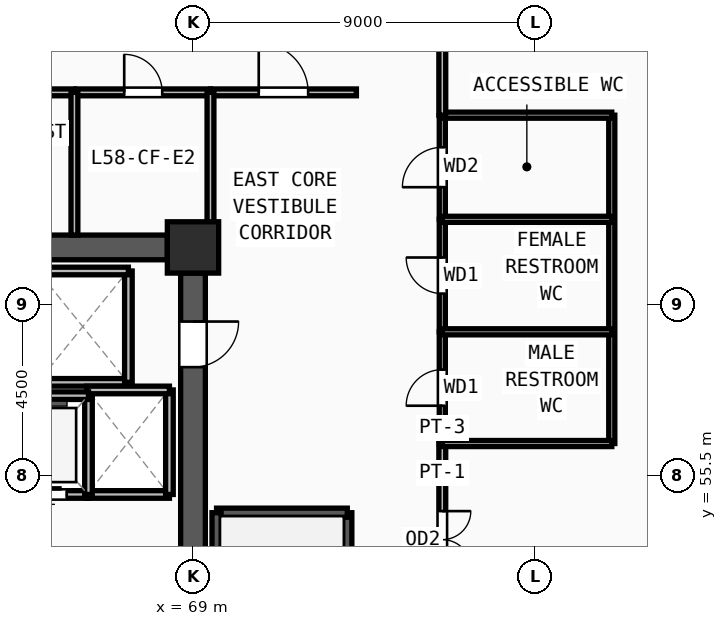
"""IFC4 building model, lengths in metres.
Left out: names, types, materials, properties, quantities, classifications, styles, units other than length and angle.
Written with IfcOpenShell. Run it as: python <this file> out.ifc"""

import sys

from ifc_helpers import new_model, si_unit, direction, frame, frame_2d, origin, origin_2d, place, context, subcontext, project, spatial, rectangle, extrude, source, transform, mapped, element, fill, save


model = new_model("IFC4")
c1 = context("Model", 3, precision=1e-05, world=origin(), true_north=direction((0.0, 1.0)))
c2 = subcontext(c1, "Body", "Model", "MODEL_VIEW")
j1 = project(units=[si_unit("LENGTHUNIT", "METRE"), si_unit("PLANEANGLEUNIT", "RADIAN")], contexts=[c1])
p1 = place(None, origin())
s1 = spatial("IfcSite", under=j1, at=p1, CompositionType="ELEMENT")
p2 = place(p1, origin())
s2 = spatial("IfcBuilding", under=s1, at=p2, CompositionType="ELEMENT")
p3 = place(p2, frame((0.0, 0.0, 224.25)))
s3 = spatial("IfcBuildingStorey", under=s2, at=p3, CompositionType="ELEMENT", Elevation=224.25)
m1 = source(origin(), c2, "Body", "SweptSolid", [
    extrude(rectangle(XDim=1.35, YDim=1.35, at=origin_2d()), origin(), (0.0, 0.0, 1.0), 3.75),
])
p4 = place(p3, frame((69.0, 61.5, 0.0), z_axis=(0.0, 0.0, 1.0), x_axis=(1.0, 0.0, 0.0)))
e1 = element("IfcColumn", 1, at=p4, inside=s3, PredefinedType="COLUMN", context=c2, shape_type="MappedRepresentation", body=[
    mapped(m1, transform((0.0, 0.0, 0.0), x_axis=(1.0, 0.0, 0.0), y_axis=(0.0, 1.0, 0.0), z_axis=(0.0, 0.0, 1.0), scale=1.0)),
])
p5 = place(p3, frame((79.867, 40.305, 0.0), z_axis=(0.0, 0.0, 1.0), x_axis=(0.444873284972, 0.895593524049, 0.0)))
e2 = element("IfcWall", 2, at=p5, inside=s3, PredefinedType="SOLIDWALL", context=c2, shape_type="SweptSolid", body=[
    extrude(rectangle(XDim=29.02, YDim=0.38, at=frame_2d((14.51, 0.0))), origin(), (0.0, 0.0, 1.0), 3.57),
])
m2 = source(origin(), c2, "Body", "SweptSolid", [
    extrude(rectangle(XDim=1.5, YDim=1.9, at=frame_2d((0.75, 0.95))), frame((0.0, 0.2, 0.0), z_axis=(0.0, -1.0, 0.0), x_axis=(1.0, 0.0, 0.0)), (0.0, 0.0, 1.0), 0.4),
])
p6 = place(p5, frame((6.505, 0.0, 0.55)))
e3 = element("IfcOpeningElement", 3, at=p6, cuts=e2, PredefinedType="OPENING", context=c2, shape_type="MappedRepresentation", body=[
    mapped(m2, transform((0.0, 0.0, 0.0), x_axis=(1.0, 0.0, 0.0), y_axis=(0.0, 1.0, 0.0), z_axis=(0.0, 0.0, 1.0), scale=1.0)),
])
p7 = place(p5, frame((13.76, 0.0, 0.55)))
e4 = element("IfcOpeningElement", 4, at=p7, cuts=e2, PredefinedType="OPENING", context=c2, shape_type="MappedRepresentation", body=[
    mapped(m2, transform((0.0, 0.0, 0.0), x_axis=(1.0, 0.0, 0.0), y_axis=(0.0, 1.0, 0.0), z_axis=(0.0, 0.0, 1.0), scale=1.0)),
])
p8 = place(p5, frame((21.015, 0.0, 0.55)))
e5 = element("IfcOpeningElement", 5, at=p8, cuts=e2, PredefinedType="OPENING", context=c2, shape_type="MappedRepresentation", body=[
    mapped(m2, transform((0.0, 0.0, 0.0), x_axis=(1.0, 0.0, 0.0), y_axis=(0.0, 1.0, 0.0), z_axis=(0.0, 0.0, 1.0), scale=1.0)),
])
p9 = place(p3, frame((60.675, 61.5, 0.0), z_axis=(0.0, 0.0, 1.0), x_axis=(1.0, 0.0, 0.0)))
e6 = element("IfcWall", 6, at=p9, inside=s3, PredefinedType="SHEAR", context=c2, shape_type="SweptSolid", body=[
    extrude(rectangle(XDim=7.65, YDim=0.65, at=frame_2d((3.825, 0.0))), origin(), (0.0, 0.0, 1.0), 3.57),
])
p10 = place(p3, frame((69.0, 60.825, 0.0), z_axis=(0.0, 0.0, 1.0), x_axis=(0.0, -1.0, 0.0)))
e7 = element("IfcWall", 7, at=p10, inside=s3, PredefinedType="SHEAR", context=c2, shape_type="SweptSolid", body=[
    extrude(rectangle(XDim=13.65, YDim=0.65, at=frame_2d((6.825, 0.0))), origin(), (0.0, 0.0, 1.0), 3.57),
])
m3 = source(origin(), c2, "Body", "SweptSolid", [
    extrude(rectangle(XDim=1.2, YDim=2.2, at=frame_2d((0.6, 1.1))), frame((0.0, 0.335, 0.0), z_axis=(0.0, -1.0, 0.0), x_axis=(1.0, 0.0, 0.0)), (0.0, 0.0, 1.0), 0.67),
])
p11 = place(p10, frame((1.275, 0.0, 0.0)))
e8 = element("IfcOpeningElement", 8, at=p11, cuts=e7, PredefinedType="OPENING", context=c2, shape_type="MappedRepresentation", body=[
    mapped(m3, transform((0.0, 0.0, 0.0), x_axis=(1.0, 0.0, 0.0), y_axis=(0.0, 1.0, 0.0), z_axis=(0.0, 0.0, 1.0), scale=1.0)),
])
p12 = place(p3, frame((73.06, 46.7, 0.0), z_axis=(0.0, 0.0, 1.0), x_axis=(0.0, 1.0, 0.0)))
e9 = element("IfcWall", 9, at=p12, inside=s3, PredefinedType="SOLIDWALL", context=c2, shape_type="SweptSolid", body=[
    extrude(rectangle(XDim=7.82, YDim=0.24, at=frame_2d((3.91, 0.0))), origin(), (0.0, 0.0, 1.0), 3.57),
])
m4 = source(origin(), c2, "Body", "SweptSolid", [
    extrude(rectangle(XDim=1.2, YDim=2.2, at=frame_2d((0.6, 1.1))), frame((0.0, 0.13, 0.0), z_axis=(0.0, -1.0, 0.0), x_axis=(1.0, 0.0, 0.0)), (0.0, 0.0, 1.0), 0.26),
])
p13 = place(p12, frame((0.32, 0.0, 0.0)))
e10 = element("IfcOpeningElement", 10, at=p13, cuts=e9, PredefinedType="OPENING", context=c2, shape_type="MappedRepresentation", body=[
    mapped(m4, transform((0.0, 0.0, 0.0), x_axis=(1.0, 0.0, 0.0), y_axis=(0.0, 1.0, 0.0), z_axis=(0.0, 0.0, 1.0), scale=1.0)),
])
p14 = place(p3, frame((73.06, 54.52, 0.0), z_axis=(0.0, 0.0, 1.0), x_axis=(-1.0, 0.0, 0.0)))
e11 = element("IfcWall", 11, at=p14, inside=s3, PredefinedType="SOLIDWALL", context=c2, shape_type="SweptSolid", body=[
    extrude(rectangle(XDim=3.44, YDim=0.24, at=frame_2d((1.72, 0.0))), origin(), (0.0, 0.0, 1.0), 3.57),
])
p15 = place(p3, frame((69.62, 54.52, 0.0), z_axis=(0.0, 0.0, 1.0), x_axis=(0.0, -1.0, 0.0)))
e12 = element("IfcWall", 12, at=p15, inside=s3, PredefinedType="SOLIDWALL", context=c2, shape_type="SweptSolid", body=[
    extrude(rectangle(XDim=7.82, YDim=0.24, at=frame_2d((3.91, 0.0))), origin(), (0.0, 0.0, 1.0), 3.57),
])
p16 = place(p3, frame((64.9, 57.95, 0.0), z_axis=(0.0, 0.0, 1.0), x_axis=(1.0, 0.0, 0.0)))
e13 = element("IfcWall", 13, at=p16, inside=s3, PredefinedType="SOLIDWALL", context=c2, shape_type="SweptSolid", body=[
    extrude(rectangle(XDim=2.4, YDim=0.2, at=frame_2d((1.2, 0.0))), origin(), (0.0, 0.0, 1.0), 3.57),
])
p17 = place(p3, frame((67.3, 57.95, 0.0), z_axis=(0.0, 0.0, 1.0), x_axis=(0.0, 1.0, 0.0)))
e14 = element("IfcWall", 14, at=p17, inside=s3, PredefinedType="SOLIDWALL", context=c2, shape_type="SweptSolid", body=[
    extrude(rectangle(XDim=2.93, YDim=0.2, at=frame_2d((1.465, 0.0))), origin(), (0.0, 0.0, 1.0), 3.57),
])
p18 = place(p3, frame((67.3, 60.88, 0.0), z_axis=(0.0, 0.0, 1.0), x_axis=(-1.0, 0.0, 0.0)))
e15 = element("IfcWall", 15, at=p18, inside=s3, PredefinedType="SOLIDWALL", context=c2, shape_type="SweptSolid", body=[
    extrude(rectangle(XDim=2.4, YDim=0.2, at=frame_2d((1.2, 0.0))), origin(), (0.0, 0.0, 1.0), 3.57),
])
p19 = place(p3, frame((66.2, 55.0, 0.0), z_axis=(0.0, 0.0, 1.0), x_axis=(1.0, 0.0, 0.0)))
e16 = element("IfcWall", 16, at=p19, inside=s3, PredefinedType="SOLIDWALL", context=c2, shape_type="SweptSolid", body=[
    extrude(rectangle(XDim=2.18, YDim=0.2, at=frame_2d((1.09, 0.0))), origin(), (0.0, 0.0, 1.0), 3.57),
])
p20 = place(p3, frame((68.38, 55.0, 0.0), z_axis=(0.0, 0.0, 1.0), x_axis=(0.0, 1.0, 0.0)))
e17 = element("IfcWall", 17, at=p20, inside=s3, PredefinedType="SOLIDWALL", context=c2, shape_type="SweptSolid", body=[
    extrude(rectangle(XDim=2.75, YDim=0.2, at=frame_2d((1.375, 0.0))), origin(), (0.0, 0.0, 1.0), 3.57),
])
p21 = place(p3, frame((68.38, 57.75, 0.0), z_axis=(0.0, 0.0, 1.0), x_axis=(-1.0, 0.0, 0.0)))
e18 = element("IfcWall", 18, at=p21, inside=s3, PredefinedType="SOLIDWALL", context=c2, shape_type="SweptSolid", body=[
    extrude(rectangle(XDim=2.18, YDim=0.2, at=frame_2d((1.09, 0.0))), origin(), (0.0, 0.0, 1.0), 3.57),
])
p22 = place(p3, frame((64.0, 55.0, 0.0), z_axis=(0.0, 0.0, 1.0), x_axis=(1.0, 0.0, 0.0)))
e19 = element("IfcWall", 19, at=p22, inside=s3, PredefinedType="SOLIDWALL", context=c2, shape_type="SweptSolid", body=[
    extrude(rectangle(XDim=2.25, YDim=0.2, at=frame_2d((1.125, 0.0))), origin(), (0.0, 0.0, 1.0), 3.57),
])
m5 = source(origin(), c2, "Body", "SweptSolid", [
    extrude(rectangle(XDim=1.1, YDim=2.2, at=frame_2d((0.55, 1.1))), frame((0.0, 0.11, 0.0), z_axis=(0.0, -1.0, 0.0), x_axis=(1.0, 0.0, 0.0)), (0.0, 0.0, 1.0), 0.22),
])
p23 = place(p22, frame((0.575, 0.0, 0.0)))
e20 = element("IfcOpeningElement", 20, at=p23, cuts=e19, PredefinedType="OPENING", context=c2, shape_type="MappedRepresentation", body=[
    mapped(m5, transform((0.0, 0.0, 0.0), x_axis=(1.0, 0.0, 0.0), y_axis=(0.0, 1.0, 0.0), z_axis=(0.0, 0.0, 1.0), scale=1.0)),
])
p24 = place(p3, frame((66.25, 55.0, 0.0), z_axis=(0.0, 0.0, 1.0), x_axis=(0.0, 1.0, 0.0)))
e21 = element("IfcWall", 21, at=p24, inside=s3, PredefinedType="SOLIDWALL", context=c2, shape_type="SweptSolid", body=[
    extrude(rectangle(XDim=2.6, YDim=0.2, at=frame_2d((1.3, 0.0))), origin(), (0.0, 0.0, 1.0), 3.57),
])
p25 = place(p3, frame((66.25, 57.6, 0.0), z_axis=(0.0, 0.0, 1.0), x_axis=(-1.0, 0.0, 0.0)))
e22 = element("IfcWall", 22, at=p25, inside=s3, PredefinedType="SOLIDWALL", context=c2, shape_type="SweptSolid", body=[
    extrude(rectangle(XDim=2.25, YDim=0.2, at=frame_2d((1.125, 0.0))), origin(), (0.0, 0.0, 1.0), 3.57),
])
p26 = place(p3, frame((75.56, 56.34, 0.0), z_axis=(0.0, 0.0, 1.0), x_axis=(0.0, 1.0, 0.0)))
e23 = element("IfcWall", 23, at=p26, inside=s3, PredefinedType="PARTITIONING", context=c2, shape_type="SweptSolid", body=[
    extrude(rectangle(XDim=2.94, YDim=0.16, at=frame_2d((1.47, 0.0))), origin(), (0.0, 0.0, 1.0), 3.57),
])
m6 = source(origin(), c2, "Body", "SweptSolid", [
    extrude(rectangle(XDim=0.95, YDim=2.15, at=frame_2d((0.475, 1.075))), frame((0.0, 0.09, 0.0), z_axis=(0.0, -1.0, 0.0), x_axis=(1.0, 0.0, 0.0)), (0.0, 0.0, 1.0), 0.18),
])
p27 = place(p26, frame((0.995, 0.0, 0.0)))
e24 = element("IfcOpeningElement", 24, at=p27, cuts=e23, PredefinedType="OPENING", context=c2, shape_type="MappedRepresentation", body=[
    mapped(m6, transform((0.0, 0.0, 0.0), x_axis=(1.0, 0.0, 0.0), y_axis=(0.0, 1.0, 0.0), z_axis=(0.0, 0.0, 1.0), scale=1.0)),
])
p28 = place(p3, frame((75.56, 59.28, 0.0), z_axis=(0.0, 0.0, 1.0), x_axis=(0.0, 1.0, 0.0)))
e25 = element("IfcWall", 25, at=p28, inside=s3, PredefinedType="PARTITIONING", context=c2, shape_type="SweptSolid", body=[
    extrude(rectangle(XDim=2.96, YDim=0.16, at=frame_2d((1.48, 0.0))), origin(), (0.0, 0.0, 1.0), 3.57),
])
p29 = place(p28, frame((1.005, 0.0, 0.0)))
e26 = element("IfcOpeningElement", 26, at=p29, cuts=e25, PredefinedType="OPENING", context=c2, shape_type="MappedRepresentation", body=[
    mapped(m6, transform((0.0, 0.0, 0.0), x_axis=(1.0, 0.0, 0.0), y_axis=(0.0, 1.0, 0.0), z_axis=(0.0, 0.0, 1.0), scale=1.0)),
])
p30 = place(p3, frame((75.56, 62.24, 0.0), z_axis=(0.0, 0.0, 1.0), x_axis=(0.0, 1.0, 0.0)))
e27 = element("IfcWall", 27, at=p30, inside=s3, PredefinedType="PARTITIONING", context=c2, shape_type="SweptSolid", body=[
    extrude(rectangle(XDim=2.74, YDim=0.16, at=frame_2d((1.37, 0.0))), origin(), (0.0, 0.0, 1.0), 3.57),
])
m7 = source(origin(), c2, "Body", "SweptSolid", [
    extrude(rectangle(XDim=1.05, YDim=2.15, at=frame_2d((0.525, 1.075))), frame((0.0, 0.09, 0.0), z_axis=(0.0, -1.0, 0.0), x_axis=(1.0, 0.0, 0.0)), (0.0, 0.0, 1.0), 0.18),
])
p31 = place(p30, frame((0.845, 0.0, 0.0)))
e28 = element("IfcOpeningElement", 28, at=p31, cuts=e27, PredefinedType="OPENING", context=c2, shape_type="MappedRepresentation", body=[
    mapped(m7, transform((0.0, 0.0, 0.0), x_axis=(1.0, 0.0, 0.0), y_axis=(0.0, 1.0, 0.0), z_axis=(0.0, 0.0, 1.0), scale=1.0)),
])
p32 = place(p3, frame((62.39, 65.58, 0.0), z_axis=(0.0, 0.0, 1.0), x_axis=(1.0, 0.0, 0.0)))
e29 = element("IfcWall", 29, at=p32, inside=s3, PredefinedType="PARTITIONING", context=c2, shape_type="SweptSolid", body=[
    extrude(rectangle(XDim=3.49, YDim=0.18, at=frame_2d((1.745, 0.0))), origin(), (0.0, 0.0, 1.0), 3.57),
])
m8 = source(origin(), c2, "Body", "SweptSolid", [
    extrude(rectangle(XDim=1.0, YDim=2.2, at=frame_2d((0.5, 1.1))), frame((0.0, 0.1, 0.0), z_axis=(0.0, -1.0, 0.0), x_axis=(1.0, 0.0, 0.0)), (0.0, 0.0, 1.0), 0.2),
])
p33 = place(p32, frame((1.245, 0.0, 0.0)))
e30 = element("IfcOpeningElement", 30, at=p33, cuts=e29, PredefinedType="OPENING", context=c2, shape_type="MappedRepresentation", body=[
    mapped(m8, transform((0.0, 0.0, 0.0), x_axis=(1.0, 0.0, 0.0), y_axis=(0.0, 1.0, 0.0), z_axis=(0.0, 0.0, 1.0), scale=1.0)),
])
p34 = place(p3, frame((65.92, 65.58, 0.0), z_axis=(0.0, 0.0, 1.0), x_axis=(1.0, 0.0, 0.0)))
e31 = element("IfcWall", 31, at=p34, inside=s3, PredefinedType="PARTITIONING", context=c2, shape_type="SweptSolid", body=[
    extrude(rectangle(XDim=3.54, YDim=0.18, at=frame_2d((1.77, 0.0))), origin(), (0.0, 0.0, 1.0), 3.57),
])
p35 = place(p34, frame((1.27, 0.0, 0.0)))
e32 = element("IfcOpeningElement", 32, at=p35, cuts=e31, PredefinedType="OPENING", context=c2, shape_type="MappedRepresentation", body=[
    mapped(m8, transform((0.0, 0.0, 0.0), x_axis=(1.0, 0.0, 0.0), y_axis=(0.0, 1.0, 0.0), z_axis=(0.0, 0.0, 1.0), scale=1.0)),
])
p36 = place(p3, frame((69.46, 65.58, 0.0), z_axis=(0.0, 0.0, 1.0), x_axis=(1.0, 0.0, 0.0)))
e33 = element("IfcWall", 33, at=p36, inside=s3, PredefinedType="PARTITIONING", context=c2, shape_type="SweptSolid", body=[
    extrude(rectangle(XDim=3.84, YDim=0.18, at=frame_2d((1.92, 0.0))), origin(), (0.0, 0.0, 1.0), 3.57),
])
m9 = source(origin(), c2, "Body", "SweptSolid", [
    extrude(rectangle(XDim=1.3, YDim=2.2, at=frame_2d((0.65, 1.1))), frame((0.0, 0.1, 0.0), z_axis=(0.0, -1.0, 0.0), x_axis=(1.0, 0.0, 0.0)), (0.0, 0.0, 1.0), 0.2),
])
p37 = place(p36, frame((1.27, 0.0, 0.0)))
e34 = element("IfcOpeningElement", 34, at=p37, cuts=e33, PredefinedType="OPENING", context=c2, shape_type="MappedRepresentation", body=[
    mapped(m9, transform((0.0, 0.0, 0.0), x_axis=(1.0, 0.0, 0.0), y_axis=(0.0, 1.0, 0.0), z_axis=(0.0, 0.0, 1.0), scale=1.0)),
])
p38 = place(p3, frame((75.56, 56.34, 0.0), z_axis=(0.0, 0.0, 1.0), x_axis=(0.0, -1.0, 0.0)))
e35 = element("IfcWall", 35, at=p38, inside=s3, PredefinedType="PARTITIONING", context=c2, shape_type="SweptSolid", body=[
    extrude(rectangle(XDim=5.055, YDim=0.18, at=frame_2d((2.528, 0.0))), origin(), (0.0, 0.0, 1.0), 3.57),
])
m10 = source(origin(), c2, "Body", "SweptSolid", [
    extrude(rectangle(XDim=1.5, YDim=2.2, at=frame_2d((0.75, 1.1))), frame((0.0, 0.1, 0.0), z_axis=(0.0, -1.0, 0.0), x_axis=(1.0, 0.0, 0.0)), (0.0, 0.0, 1.0), 0.2),
])
p39 = place(p38, frame((1.778, 0.0, 0.0)))
e36 = element("IfcOpeningElement", 36, at=p39, cuts=e35, PredefinedType="OPENING", context=c2, shape_type="MappedRepresentation", body=[
    mapped(m10, transform((0.0, 0.0, 0.0), x_axis=(1.0, 0.0, 0.0), y_axis=(0.0, 1.0, 0.0), z_axis=(0.0, 0.0, 1.0), scale=1.0)),
])
p40 = place(p3, frame((80.02, 56.34, 0.0), z_axis=(0.0, 0.0, 1.0), x_axis=(0.0, 1.0, 0.0)))
e37 = element("IfcWall", 37, at=p40, inside=s3, PredefinedType="PARTITIONING", context=c2, shape_type="SweptSolid", body=[
    extrude(rectangle(XDim=8.64, YDim=0.16, at=frame_2d((4.32, 0.0))), origin(), (0.0, 0.0, 1.0), 3.57),
])
for number, where, z_axis, x_axis in (
    (38, (75.56, 56.34, 0.0), (0.0, 0.0, 1.0), (1.0, 0.0, 0.0)),
    (39, (75.56, 59.28, 0.0), (0.0, 0.0, 1.0), (1.0, 0.0, 0.0)),
    (40, (75.56, 62.24, 0.0), (0.0, 0.0, 1.0), (1.0, 0.0, 0.0)),
    (41, (75.56, 64.98, 0.0), (0.0, 0.0, 1.0), (1.0, 0.0, 0.0)),
):
    element("IfcWall", number, at=place(p3, frame(where, z_axis=z_axis, x_axis=x_axis)), inside=s3, PredefinedType="PARTITIONING", context=c2, shape_type="SweptSolid", body=[
        extrude(rectangle(XDim=4.46, YDim=0.16, at=frame_2d((2.23, 0.0))), origin(), (0.0, 0.0, 1.0), 3.57),
    ])
p41 = place(p3, frame((65.88, 61.825, 0.0), z_axis=(0.0, 0.0, 1.0), x_axis=(0.0, 1.0, 0.0)))
e42 = element("IfcWall", 42, at=p41, inside=s3, PredefinedType="PARTITIONING", context=c2, shape_type="SweptSolid", body=[
    extrude(rectangle(XDim=3.755, YDim=0.18, at=frame_2d((1.877, 0.0))), origin(), (0.0, 0.0, 1.0), 3.57),
])
p42 = place(p3, frame((69.46, 61.95, 0.0), z_axis=(0.0, 0.0, 1.0), x_axis=(0.0, 1.0, 0.0)))
e43 = element("IfcWall", 43, at=p42, inside=s3, PredefinedType="PARTITIONING", context=c2, shape_type="SweptSolid", body=[
    extrude(rectangle(XDim=3.63, YDim=0.18, at=frame_2d((1.815, 0.0))), origin(), (0.0, 0.0, 1.0), 3.57),
])
p43 = place(p3, frame((75.56, 67.215, 0.0), z_axis=(0.0, 0.0, 1.0), x_axis=(0.0, -1.0, 0.0)))
e44 = element("IfcWall", 44, at=p43, inside=s3, PredefinedType="PARTITIONING", context=c2, shape_type="SweptSolid", body=[
    extrude(rectangle(XDim=2.235, YDim=0.18, at=frame_2d((1.118, 0.0))), origin(), (0.0, 0.0, 1.0), 3.57),
])
m11 = source(origin(), c2, "Body", "SweptSolid", [
    extrude(rectangle(XDim=1.2, YDim=2.2, at=frame_2d((0.6, 1.1))), frame((0.0, 0.025, 0.0), z_axis=(0.0, -1.0, 0.0), x_axis=(1.0, 0.0, 0.0)), (0.0, 0.0, 1.0), 0.05),
])
p44 = place(p11, origin())
e45 = element("IfcDoor", 45, at=p44, inside=s3, OperationType="SINGLE_SWING_LEFT", PredefinedType="DOOR", context=c2, shape_type="MappedRepresentation", body=[
    mapped(m11, transform((0.0, 0.0, 0.0), x_axis=(1.0, 0.0, 0.0), y_axis=(0.0, 1.0, 0.0), z_axis=(0.0, 0.0, 1.0), scale=1.0)),
])
fill(e8, e45)
m12 = source(origin(), c2, "Body", "SweptSolid", [
    extrude(rectangle(XDim=1.1, YDim=2.2, at=frame_2d((0.55, 1.1))), frame((0.0, 0.025, 0.0), z_axis=(0.0, -1.0, 0.0), x_axis=(1.0, 0.0, 0.0)), (0.0, 0.0, 1.0), 0.05),
])
p45 = place(p23, origin())
e46 = element("IfcDoor", 46, at=p45, inside=s3, OperationType="SLIDING_TO_LEFT", PredefinedType="DOOR", context=c2, shape_type="MappedRepresentation", body=[
    mapped(m12, transform((0.0, 0.0, 0.0), x_axis=(1.0, 0.0, 0.0), y_axis=(0.0, 1.0, 0.0), z_axis=(0.0, 0.0, 1.0), scale=1.0)),
])
fill(e20, e46)
m13 = source(origin(), c2, "Body", "SweptSolid", [
    extrude(rectangle(XDim=0.95, YDim=2.15, at=frame_2d((0.475, 1.075))), frame((0.0, 0.025, 0.0), z_axis=(0.0, -1.0, 0.0), x_axis=(1.0, 0.0, 0.0)), (0.0, 0.0, 1.0), 0.05),
])
p46 = place(p27, origin())
e47 = element("IfcDoor", 47, at=p46, inside=s3, OperationType="SINGLE_SWING_LEFT", PredefinedType="DOOR", context=c2, shape_type="MappedRepresentation", body=[
    mapped(m13, transform((0.0, 0.0, 0.0), x_axis=(1.0, 0.0, 0.0), y_axis=(0.0, 1.0, 0.0), z_axis=(0.0, 0.0, 1.0), scale=1.0)),
])
fill(e24, e47)
p47 = place(p29, origin())
e48 = element("IfcDoor", 48, at=p47, inside=s3, OperationType="SINGLE_SWING_RIGHT", PredefinedType="DOOR", context=c2, shape_type="MappedRepresentation", body=[
    mapped(m13, transform((0.0, 0.0, 0.0), x_axis=(1.0, 0.0, 0.0), y_axis=(0.0, 1.0, 0.0), z_axis=(0.0, 0.0, 1.0), scale=1.0)),
])
fill(e26, e48)
m14 = source(origin(), c2, "Body", "SweptSolid", [
    extrude(rectangle(XDim=1.05, YDim=2.15, at=frame_2d((0.525, 1.075))), frame((0.0, 0.025, 0.0), z_axis=(0.0, -1.0, 0.0), x_axis=(1.0, 0.0, 0.0)), (0.0, 0.0, 1.0), 0.05),
])
p48 = place(p31, origin())
e49 = element("IfcDoor", 49, at=p48, inside=s3, OperationType="SINGLE_SWING_LEFT", PredefinedType="DOOR", context=c2, shape_type="MappedRepresentation", body=[
    mapped(m14, transform((0.0, 0.0, 0.0), x_axis=(1.0, 0.0, 0.0), y_axis=(0.0, 1.0, 0.0), z_axis=(0.0, 0.0, 1.0), scale=1.0)),
])
fill(e28, e49)
m15 = source(origin(), c2, "Body", "SweptSolid", [
    extrude(rectangle(XDim=1.0, YDim=2.2, at=frame_2d((0.5, 1.1))), frame((0.0, 0.025, 0.0), z_axis=(0.0, -1.0, 0.0), x_axis=(1.0, 0.0, 0.0)), (0.0, 0.0, 1.0), 0.05),
])
p49 = place(p35, origin())
e50 = element("IfcDoor", 50, at=p49, inside=s3, OperationType="SINGLE_SWING_LEFT", PredefinedType="DOOR", context=c2, shape_type="MappedRepresentation", body=[
    mapped(m15, transform((0.0, 0.0, 0.0), x_axis=(1.0, 0.0, 0.0), y_axis=(0.0, 1.0, 0.0), z_axis=(0.0, 0.0, 1.0), scale=1.0)),
])
fill(e32, e50)
m16 = source(origin(), c2, "Body", "SweptSolid", [
    extrude(rectangle(XDim=1.3, YDim=2.2, at=frame_2d((0.65, 1.1))), frame((0.0, 0.025, 0.0), z_axis=(0.0, -1.0, 0.0), x_axis=(1.0, 0.0, 0.0)), (0.0, 0.0, 1.0), 0.05),
])
p50 = place(p37, origin())
e51 = element("IfcDoor", 51, at=p50, inside=s3, OperationType="SINGLE_SWING_LEFT", PredefinedType="DOOR", context=c2, shape_type="MappedRepresentation", body=[
    mapped(m16, transform((0.0, 0.0, 0.0), x_axis=(1.0, 0.0, 0.0), y_axis=(0.0, 1.0, 0.0), z_axis=(0.0, 0.0, 1.0), scale=1.0)),
])
fill(e34, e51)
m17 = source(origin(), c2, "Body", "SweptSolid", [
    extrude(rectangle(XDim=1.5, YDim=2.2, at=frame_2d((0.75, 1.1))), frame((0.0, 0.025, 0.0), z_axis=(0.0, -1.0, 0.0), x_axis=(1.0, 0.0, 0.0)), (0.0, 0.0, 1.0), 0.05),
])
p51 = place(p39, origin())
e52 = element("IfcDoor", 52, at=p51, inside=s3, OperationType="DOUBLE_DOOR_SINGLE_SWING", PredefinedType="DOOR", context=c2, shape_type="MappedRepresentation", body=[
    mapped(m17, transform((0.0, 0.0, 0.0), x_axis=(1.0, 0.0, 0.0), y_axis=(0.0, 1.0, 0.0), z_axis=(0.0, 0.0, 1.0), scale=1.0)),
])
fill(e36, e52)
save(model, sys.argv[1])
